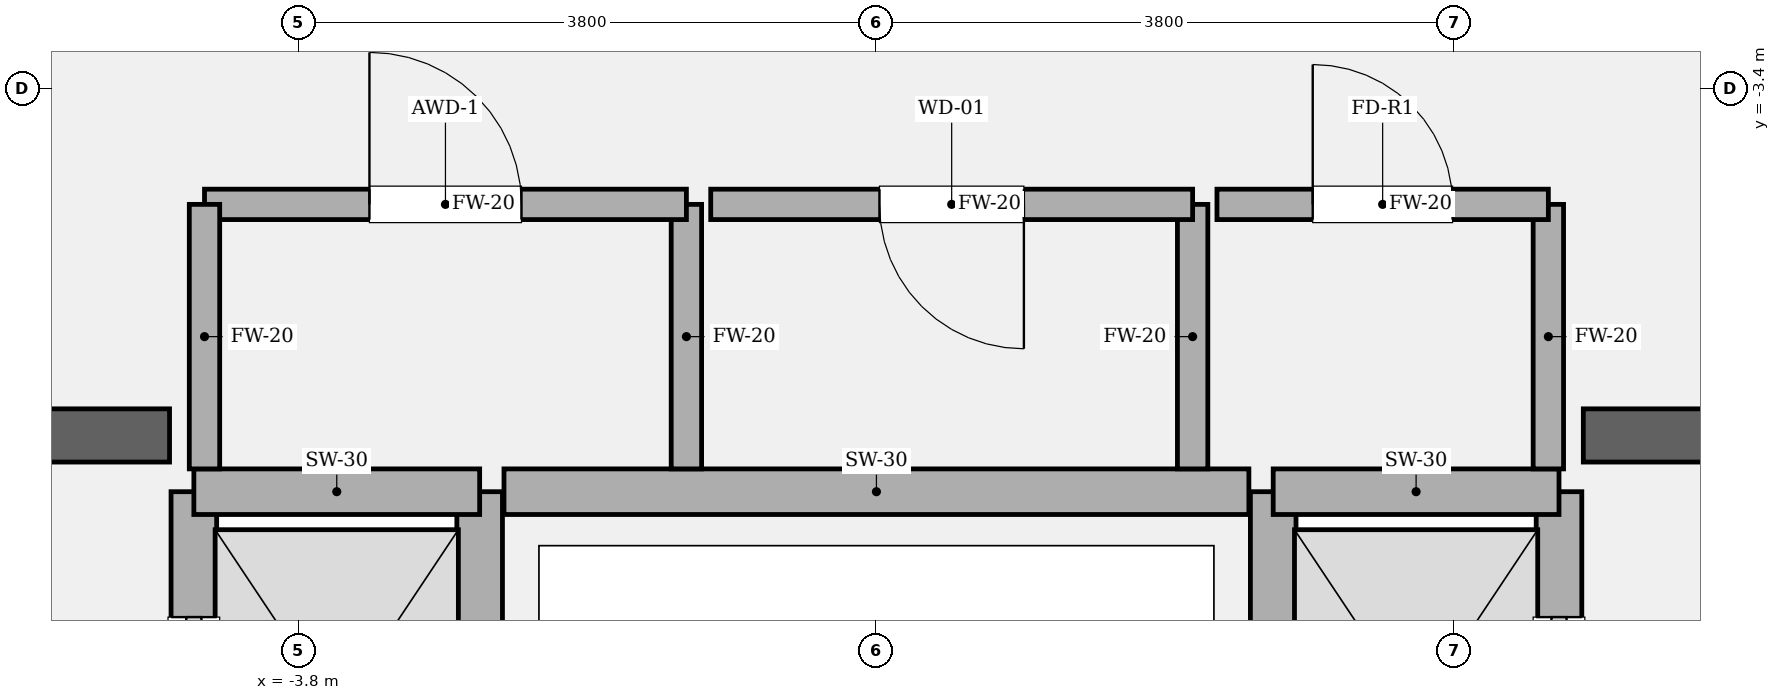
"""IFC4 building model, lengths in metres.
Left out: names, types, materials, properties, quantities, classifications, styles, units other than length and angle.
Written with IfcOpenShell. Run it as: python <this file> out.ifc"""

import sys

from ifc_helpers import new_model, si_unit, direction, frame, frame_2d, origin, place, context, subcontext, project, spatial, rectangle, extrude, element, fill, save


model = new_model("IFC4")
c1 = context("Model", 3, precision=1e-05, world=origin(), true_north=direction((0.0, 1.0)))
c2 = subcontext(c1, "Body", "Model", "MODEL_VIEW")
j1 = project(units=[si_unit("LENGTHUNIT", "METRE"), si_unit("PLANEANGLEUNIT", "RADIAN")], contexts=[c1])
p1 = place(None, origin())
s1 = spatial("IfcSite", under=j1, at=p1, CompositionType="ELEMENT")
p2 = place(p1, origin())
s2 = spatial("IfcBuilding", under=s1, at=p2, CompositionType="ELEMENT")
p3 = place(p2, frame((0.0, 0.0, 32.25)))
s3 = spatial("IfcBuildingStorey", under=s2, at=p3, CompositionType="ELEMENT", Elevation=32.25)
p4 = place(p3, frame((-9.825, -5.68, 0.0), z_axis=(0.0, 0.0, 1.0), x_axis=(1.0, 0.0, 0.0)))
e1 = element("IfcWall", 1, at=p4, inside=s3, PredefinedType="SOLIDWALL", context=c2, shape_type="SweptSolid", body=[
    extrude(rectangle(XDim=5.175, YDim=0.35, at=frame_2d((2.587, 0.0))), origin(), (0.0, 0.0, 1.0), 4.05),
])
p5 = place(p4, frame((1.285, 0.0, 0.0)))
e2 = element("IfcOpeningElement", 2, at=p5, cuts=e1, PredefinedType="OPENING", context=c2, shape_type="SweptSolid", body=[
    extrude(rectangle(XDim=1.18, YDim=2.2, at=frame_2d((0.59, 1.1))), frame((0.0, 0.185, 0.0), z_axis=(0.0, -1.0, 0.0), x_axis=(1.0, 0.0, 0.0)), (0.0, 0.0, 1.0), 0.37),
])
p6 = place(p3, frame((4.65, -5.68, 0.0), z_axis=(0.0, 0.0, 1.0), x_axis=(1.0, 0.0, 0.0)))
e3 = element("IfcWall", 3, at=p6, inside=s3, PredefinedType="SOLIDWALL", context=c2, shape_type="SweptSolid", body=[
    extrude(rectangle(XDim=5.175, YDim=0.35, at=frame_2d((2.587, 0.0))), origin(), (0.0, 0.0, 1.0), 4.05),
])
p7 = place(p6, frame((2.71, 0.0, 0.0)))
e4 = element("IfcOpeningElement", 4, at=p7, cuts=e3, PredefinedType="OPENING", context=c2, shape_type="SweptSolid", body=[
    extrude(rectangle(XDim=1.18, YDim=2.2, at=frame_2d((0.59, 1.1))), frame((0.0, 0.185, 0.0), z_axis=(0.0, -1.0, 0.0), x_axis=(1.0, 0.0, 0.0)), (0.0, 0.0, 1.0), 0.37),
])
p8 = place(p3, frame((-4.49, -8.82, 0.0), z_axis=(0.0, 0.0, 1.0), x_axis=(0.0, 1.0, 0.0)))
e5 = element("IfcWall", 5, at=p8, inside=s3, PredefinedType="SOLIDWALL", context=c2, shape_type="SweptSolid", body=[
    extrude(rectangle(XDim=2.77, YDim=0.3, at=frame_2d((1.385, 0.0))), origin(), (0.0, 0.0, 1.0), 3.81),
])
p9 = place(p8, frame((0.825, 0.0, 0.0)))
e6 = element("IfcOpeningElement", 6, at=p9, cuts=e5, PredefinedType="OPENING", context=c2, shape_type="SweptSolid", body=[
    extrude(rectangle(XDim=1.12, YDim=2.25, at=frame_2d((0.56, 1.125))), frame((0.0, 0.16, 0.0), z_axis=(0.0, -1.0, 0.0), x_axis=(1.0, 0.0, 0.0)), (0.0, 0.0, 1.0), 0.32),
])
p10 = place(p3, frame((-2.61, -8.82, 0.0), z_axis=(0.0, 0.0, 1.0), x_axis=(0.0, 1.0, 0.0)))
e7 = element("IfcWall", 7, at=p10, inside=s3, PredefinedType="SOLIDWALL", context=c2, shape_type="SweptSolid", body=[
    extrude(rectangle(XDim=2.77, YDim=0.3, at=frame_2d((1.385, 0.0))), origin(), (0.0, 0.0, 1.0), 3.81),
])
p11 = place(p3, frame((-4.49, -6.05, 0.0), z_axis=(0.0, 0.0, 1.0), x_axis=(1.0, 0.0, 0.0)))
e8 = element("IfcWall", 8, at=p11, inside=s3, PredefinedType="SOLIDWALL", context=c2, shape_type="SweptSolid", body=[
    extrude(rectangle(XDim=1.88, YDim=0.3, at=frame_2d((0.94, 0.0))), origin(), (0.0, 0.0, 1.0), 3.81),
])
p12 = place(p3, frame((4.49, -8.82, 0.0), z_axis=(0.0, 0.0, 1.0), x_axis=(0.0, 1.0, 0.0)))
e9 = element("IfcWall", 9, at=p12, inside=s3, PredefinedType="SOLIDWALL", context=c2, shape_type="SweptSolid", body=[
    extrude(rectangle(XDim=2.77, YDim=0.3, at=frame_2d((1.385, 0.0))), origin(), (0.0, 0.0, 1.0), 3.81),
])
p13 = place(p12, frame((0.825, 0.0, 0.0)))
e10 = element("IfcOpeningElement", 10, at=p13, cuts=e9, PredefinedType="OPENING", context=c2, shape_type="SweptSolid", body=[
    extrude(rectangle(XDim=1.12, YDim=2.25, at=frame_2d((0.56, 1.125))), frame((0.0, 0.16, 0.0), z_axis=(0.0, -1.0, 0.0), x_axis=(1.0, 0.0, 0.0)), (0.0, 0.0, 1.0), 0.32),
])
p14 = place(p3, frame((2.61, -8.82, 0.0), z_axis=(0.0, 0.0, 1.0), x_axis=(0.0, 1.0, 0.0)))
e11 = element("IfcWall", 11, at=p14, inside=s3, PredefinedType="SOLIDWALL", context=c2, shape_type="SweptSolid", body=[
    extrude(rectangle(XDim=2.77, YDim=0.3, at=frame_2d((1.385, 0.0))), origin(), (0.0, 0.0, 1.0), 3.81),
])
p15 = place(p3, frame((2.61, -6.05, 0.0), z_axis=(0.0, 0.0, 1.0), x_axis=(1.0, 0.0, 0.0)))
e12 = element("IfcWall", 12, at=p15, inside=s3, PredefinedType="SOLIDWALL", context=c2, shape_type="SweptSolid", body=[
    extrude(rectangle(XDim=1.88, YDim=0.3, at=frame_2d((0.94, 0.0))), origin(), (0.0, 0.0, 1.0), 3.81),
])
p16 = place(p3, frame((-2.45, -6.05, 0.0), z_axis=(0.0, 0.0, 1.0), x_axis=(1.0, 0.0, 0.0)))
e13 = element("IfcWall", 13, at=p16, inside=s3, PredefinedType="SOLIDWALL", context=c2, shape_type="SweptSolid", body=[
    extrude(rectangle(XDim=4.9, YDim=0.3, at=frame_2d((2.45, 0.0))), origin(), (0.0, 0.0, 1.0), 3.81),
])
p17 = place(p3, frame((-1.25, -5.9, 0.0), z_axis=(0.0, 0.0, 1.0), x_axis=(0.0, 1.0, 0.0)))
e14 = element("IfcWall", 14, at=p17, inside=s3, PredefinedType="SOLIDWALL", context=c2, shape_type="SweptSolid", body=[
    extrude(rectangle(XDim=1.74, YDim=0.2, at=frame_2d((0.87, 0.0))), origin(), (0.0, 0.0, 1.0), 3.81),
])
p18 = place(p3, frame((-1.25, -4.16, 0.0), z_axis=(0.0, 0.0, 1.0), x_axis=(-1.0, 0.0, 0.0)))
e15 = element("IfcWall", 15, at=p18, inside=s3, PredefinedType="SOLIDWALL", context=c2, shape_type="SweptSolid", body=[
    extrude(rectangle(XDim=3.17, YDim=0.2, at=frame_2d((1.585, 0.0))), origin(), (0.0, 0.0, 1.0), 3.81),
])
p19 = place(p18, frame((1.085, 0.0, 0.0)))
e16 = element("IfcOpeningElement", 16, at=p19, cuts=e15, PredefinedType="OPENING", context=c2, shape_type="SweptSolid", body=[
    extrude(rectangle(XDim=1.0, YDim=2.15, at=frame_2d((0.5, 1.075))), frame((0.0, 0.11, 0.0), z_axis=(0.0, -1.0, 0.0), x_axis=(1.0, 0.0, 0.0)), (0.0, 0.0, 1.0), 0.22),
])
for number, where, z_axis, x_axis in (
    (17, (-4.42, -4.16, 0.0), (0.0, 0.0, 1.0), (0.0, -1.0, 0.0)),
    (18, (2.08, -5.9, 0.0), (0.0, 0.0, 1.0), (0.0, 1.0, 0.0)),
):
    element("IfcWall", number, at=place(p3, frame(where, z_axis=z_axis, x_axis=x_axis)), inside=s3, PredefinedType="SOLIDWALL", context=c2, shape_type="SweptSolid", body=[
        extrude(rectangle(XDim=1.74, YDim=0.2, at=frame_2d((0.87, 0.0))), origin(), (0.0, 0.0, 1.0), 3.81),
    ])
p20 = place(p3, frame((2.08, -4.16, 0.0), z_axis=(0.0, 0.0, 1.0), x_axis=(-1.0, 0.0, 0.0)))
e19 = element("IfcWall", 19, at=p20, inside=s3, PredefinedType="SOLIDWALL", context=c2, shape_type="SweptSolid", body=[
    extrude(rectangle(XDim=3.17, YDim=0.2, at=frame_2d((1.585, 0.0))), origin(), (0.0, 0.0, 1.0), 3.81),
])
p21 = place(p20, frame((1.11, 0.0, 0.0)))
e20 = element("IfcOpeningElement", 20, at=p21, cuts=e19, PredefinedType="OPENING", context=c2, shape_type="SweptSolid", body=[
    extrude(rectangle(XDim=0.95, YDim=2.15, at=frame_2d((0.475, 1.075))), frame((0.0, 0.11, 0.0), z_axis=(0.0, -1.0, 0.0), x_axis=(1.0, 0.0, 0.0)), (0.0, 0.0, 1.0), 0.22),
])
p22 = place(p3, frame((4.42, -5.9, 0.0), z_axis=(0.0, 0.0, 1.0), x_axis=(0.0, 1.0, 0.0)))
e21 = element("IfcWall", 21, at=p22, inside=s3, PredefinedType="SOLIDWALL", context=c2, shape_type="SweptSolid", body=[
    extrude(rectangle(XDim=1.74, YDim=0.2, at=frame_2d((0.87, 0.0))), origin(), (0.0, 0.0, 1.0), 3.81),
])
p23 = place(p3, frame((4.42, -4.16, 0.0), z_axis=(0.0, 0.0, 1.0), x_axis=(-1.0, 0.0, 0.0)))
e22 = element("IfcWall", 22, at=p23, inside=s3, PredefinedType="SOLIDWALL", context=c2, shape_type="SweptSolid", body=[
    extrude(rectangle(XDim=2.18, YDim=0.2, at=frame_2d((1.09, 0.0))), origin(), (0.0, 0.0, 1.0), 3.81),
])
p24 = place(p23, frame((0.63, 0.0, 0.0)))
e23 = element("IfcOpeningElement", 23, at=p24, cuts=e22, PredefinedType="OPENING", context=c2, shape_type="SweptSolid", body=[
    extrude(rectangle(XDim=0.92, YDim=2.1, at=frame_2d((0.46, 1.05))), frame((0.0, 0.11, 0.0), z_axis=(0.0, -1.0, 0.0), x_axis=(1.0, 0.0, 0.0)), (0.0, 0.0, 1.0), 0.22),
])
p25 = place(p9, origin())
e24 = element("IfcDoor", 24, at=p25, inside=s3, OperationType="SLIDING_TO_LEFT", PredefinedType="DOOR", context=c2, shape_type="SweptSolid", body=[
    extrude(rectangle(XDim=1.12, YDim=2.25, at=frame_2d((0.56, 1.125))), frame((0.0, 0.025, 0.0), z_axis=(0.0, -1.0, 0.0), x_axis=(1.0, 0.0, 0.0)), (0.0, 0.0, 1.0), 0.05),
])
fill(e6, e24)
p26 = place(p13, origin())
e25 = element("IfcDoor", 25, at=p26, inside=s3, OperationType="SLIDING_TO_RIGHT", PredefinedType="DOOR", context=c2, shape_type="SweptSolid", body=[
    extrude(rectangle(XDim=1.12, YDim=2.25, at=frame_2d((0.56, 1.125))), frame((0.0, 0.025, 0.0), z_axis=(0.0, -1.0, 0.0), x_axis=(1.0, 0.0, 0.0)), (0.0, 0.0, 1.0), 0.05),
])
fill(e10, e25)
p27 = place(p19, origin())
e26 = element("IfcDoor", 26, at=p27, inside=s3, OperationType="SINGLE_SWING_RIGHT", PredefinedType="DOOR", context=c2, shape_type="SweptSolid", body=[
    extrude(rectangle(XDim=1.0, YDim=2.15, at=frame_2d((0.5, 1.075))), frame((0.0, 0.025, 0.0), z_axis=(0.0, -1.0, 0.0), x_axis=(1.0, 0.0, 0.0)), (0.0, 0.0, 1.0), 0.05),
])
fill(e16, e26)
p28 = place(p21, origin())
e27 = element("IfcDoor", 27, at=p28, inside=s3, OperationType="SINGLE_SWING_LEFT", PredefinedType="DOOR", context=c2, shape_type="SweptSolid", body=[
    extrude(rectangle(XDim=0.95, YDim=2.15, at=frame_2d((0.475, 1.075))), frame((0.0, 0.025, 0.0), z_axis=(0.0, -1.0, 0.0), x_axis=(1.0, 0.0, 0.0)), (0.0, 0.0, 1.0), 0.05),
])
fill(e20, e27)
p29 = place(p24, origin())
e28 = element("IfcDoor", 28, at=p29, inside=s3, OperationType="SINGLE_SWING_RIGHT", PredefinedType="DOOR", context=c2, shape_type="SweptSolid", body=[
    extrude(rectangle(XDim=0.92, YDim=2.1, at=frame_2d((0.46, 1.05))), frame((0.0, 0.025, 0.0), z_axis=(0.0, -1.0, 0.0), x_axis=(1.0, 0.0, 0.0)), (0.0, 0.0, 1.0), 0.05),
])
fill(e23, e28)
save(model, sys.argv[1])
